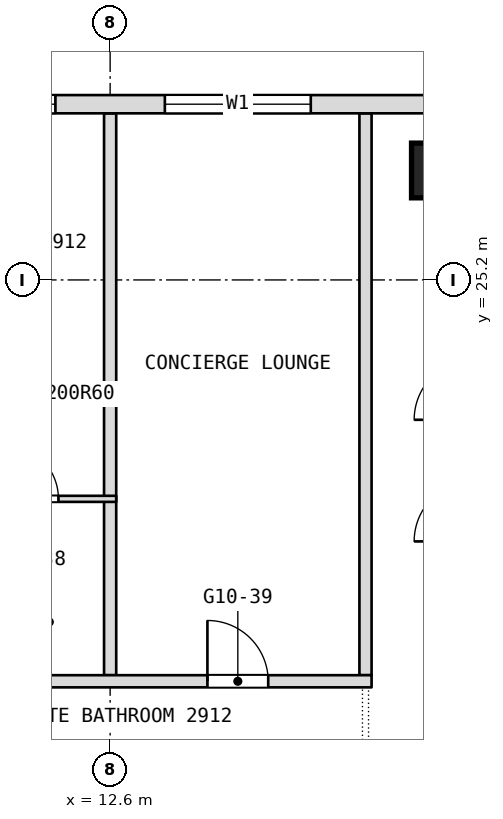
"""IFC4 building model, lengths in metres.
Left out: names, types, materials, properties, quantities, classifications, styles, units other than length and angle.
Written with IfcOpenShell. Run it as: python <this file> out.ifc"""

import sys

from ifc_helpers import new_model, si_unit, direction, frame, frame_2d, origin, origin_2d, place, context, subcontext, project, spatial, rectangle, extrude, element, fill, save


model = new_model("IFC4")
c1 = context("Model", 3, precision=1e-05, world=origin(), true_north=direction((0.0, 1.0)))
c2 = subcontext(c1, "Body", "Model", "MODEL_VIEW")
j1 = project(units=[si_unit("LENGTHUNIT", "METRE"), si_unit("PLANEANGLEUNIT", "RADIAN")], contexts=[c1])
p1 = place(None, origin())
s1 = spatial("IfcSite", under=j1, at=p1, CompositionType="ELEMENT")
p2 = place(p1, origin())
s2 = spatial("IfcBuilding", under=s1, at=p2, CompositionType="ELEMENT")
p3 = place(p2, frame((0.0, 0.0, 130.1)))
s3 = spatial("IfcBuildingStorey", under=s2, at=p3, CompositionType="ELEMENT", Elevation=130.1)
p4 = place(p3, frame((18.007, 27.0, 0.0), z_axis=(0.0, 0.0, 1.0), x_axis=(1.0, 0.0, 0.0)))
e1 = element("IfcColumn", 1, at=p4, inside=s3, PredefinedType="COLUMN", context=c2, shape_type="SweptSolid", body=[
    extrude(rectangle(XDim=0.9, YDim=0.9, at=origin_2d()), origin(), (0.0, 0.0, 1.0), 3.6),
])
for number, where, z_axis, x_axis in (
    (2, (16.8, 18.7, 0.0), (0.0, 0.0, 1.0), (0.0, 1.0, 0.0)),
    (3, (12.6, 18.7, 0.0), (0.0, 0.0, 1.0), (0.0, 1.0, 0.0)),
):
    element("IfcWall", number, at=place(p3, frame(where, z_axis=z_axis, x_axis=x_axis)), inside=s3, PredefinedType="PARTITIONING", context=c2, shape_type="SweptSolid", body=[
        extrude(rectangle(XDim=9.24, YDim=0.2, at=frame_2d((4.62, 0.0))), origin(), (0.0, 0.0, 1.0), 3.34),
    ])
p5 = place(p3, frame((10.7, 18.6, 0.0), z_axis=(0.0, 0.0, 1.0), x_axis=(1.0, 0.0, 0.0)))
e4 = element("IfcWall", 4, at=p5, inside=s3, PredefinedType="PARTITIONING", context=c2, shape_type="SweptSolid", body=[
    extrude(rectangle(XDim=6.2, YDim=0.2, at=frame_2d((3.1, 0.0))), origin(), (0.0, 0.0, 1.0), 3.34),
])
p6 = place(p5, frame((3.5, 0.0, 0.0)))
e5 = element("IfcOpeningElement", 5, at=p6, cuts=e4, PredefinedType="OPENING", context=c2, shape_type="SweptSolid", body=[
    extrude(rectangle(XDim=1.0, YDim=2.1, at=frame_2d((0.5, 1.05))), frame((0.0, 0.1, 0.0), z_axis=(0.0, -1.0, 0.0), x_axis=(1.0, 0.0, 0.0)), (0.0, 0.0, 1.0), 0.2),
])
p7 = place(p3, frame((10.7, 21.6, 0.0), z_axis=(0.0, 0.0, 1.0), x_axis=(1.0, 0.0, 0.0)))
e6 = element("IfcWall", 6, at=p7, inside=s3, PredefinedType="PARTITIONING", context=c2, shape_type="SweptSolid", body=[
    extrude(rectangle(XDim=2.0, YDim=0.1, at=frame_2d((1.0, 0.0))), origin(), (0.0, 0.0, 1.0), 3.34),
])
p8 = place(p7, frame((0.15, 0.0, 0.0)))
e7 = element("IfcOpeningElement", 7, at=p8, cuts=e6, PredefinedType="OPENING", context=c2, shape_type="SweptSolid", body=[
    extrude(rectangle(XDim=0.9, YDim=2.1, at=frame_2d((0.45, 1.05))), frame((0.0, 0.05, 0.0), z_axis=(0.0, -1.0, 0.0), x_axis=(1.0, 0.0, 0.0)), (0.0, 0.0, 1.0), 0.1),
])
p9 = place(p3, frame((21.306, 28.09, 0.0), z_axis=(0.0, 0.0, 1.0), x_axis=(-1.0, 0.0, 0.0)))
e8 = element("IfcWall", 8, at=p9, inside=s3, PredefinedType="NOTDEFINED", context=c2, shape_type="SweptSolid", body=[
    extrude(rectangle(XDim=42.612, YDim=0.3, at=frame_2d((21.306, 0.0))), origin(), (0.0, 0.0, 1.0), 3.6),
])
p10 = place(p9, frame((5.406, 0.0, 0.9)))
e9 = element("IfcOpeningElement", 9, at=p10, cuts=e8, PredefinedType="OPENING", context=c2, shape_type="SweptSolid", body=[
    extrude(rectangle(XDim=2.4, YDim=2.1, at=frame_2d((1.2, 1.05))), frame((0.0, 0.15, 0.0), z_axis=(0.0, -1.0, 0.0), x_axis=(1.0, 0.0, 0.0)), (0.0, 0.0, 1.0), 0.3),
])
p11 = place(p9, frame((9.606, 0.0, 0.9)))
e10 = element("IfcOpeningElement", 10, at=p11, cuts=e8, PredefinedType="OPENING", context=c2, shape_type="SweptSolid", body=[
    extrude(rectangle(XDim=2.4, YDim=2.1, at=frame_2d((1.2, 1.05))), frame((0.0, 0.15, 0.0), z_axis=(0.0, -1.0, 0.0), x_axis=(1.0, 0.0, 0.0)), (0.0, 0.0, 1.0), 0.3),
])
p12 = place(p9, frame((13.806, 0.0, 0.9)))
e11 = element("IfcOpeningElement", 11, at=p12, cuts=e8, PredefinedType="OPENING", context=c2, shape_type="SweptSolid", body=[
    extrude(rectangle(XDim=2.4, YDim=2.1, at=frame_2d((1.2, 1.05))), frame((0.0, 0.15, 0.0), z_axis=(0.0, -1.0, 0.0), x_axis=(1.0, 0.0, 0.0)), (0.0, 0.0, 1.0), 0.3),
])
p13 = place(p9, frame((18.006, 0.0, 0.9)))
e12 = element("IfcOpeningElement", 12, at=p13, cuts=e8, PredefinedType="OPENING", context=c2, shape_type="SweptSolid", body=[
    extrude(rectangle(XDim=2.4, YDim=2.1, at=frame_2d((1.2, 1.05))), frame((0.0, 0.15, 0.0), z_axis=(0.0, -1.0, 0.0), x_axis=(1.0, 0.0, 0.0)), (0.0, 0.0, 1.0), 0.3),
])
p14 = place(p9, frame((22.206, 0.0, 0.9)))
e13 = element("IfcOpeningElement", 13, at=p14, cuts=e8, PredefinedType="OPENING", context=c2, shape_type="SweptSolid", body=[
    extrude(rectangle(XDim=2.4, YDim=2.1, at=frame_2d((1.2, 1.05))), frame((0.0, 0.15, 0.0), z_axis=(0.0, -1.0, 0.0), x_axis=(1.0, 0.0, 0.0)), (0.0, 0.0, 1.0), 0.3),
])
p15 = place(p9, frame((26.406, 0.0, 0.9)))
e14 = element("IfcOpeningElement", 14, at=p15, cuts=e8, PredefinedType="OPENING", context=c2, shape_type="SweptSolid", body=[
    extrude(rectangle(XDim=2.4, YDim=2.1, at=frame_2d((1.2, 1.05))), frame((0.0, 0.15, 0.0), z_axis=(0.0, -1.0, 0.0), x_axis=(1.0, 0.0, 0.0)), (0.0, 0.0, 1.0), 0.3),
])
p16 = place(p9, frame((30.606, 0.0, 0.9)))
e15 = element("IfcOpeningElement", 15, at=p16, cuts=e8, PredefinedType="OPENING", context=c2, shape_type="SweptSolid", body=[
    extrude(rectangle(XDim=2.4, YDim=2.1, at=frame_2d((1.2, 1.05))), frame((0.0, 0.15, 0.0), z_axis=(0.0, -1.0, 0.0), x_axis=(1.0, 0.0, 0.0)), (0.0, 0.0, 1.0), 0.3),
])
p17 = place(p9, frame((34.806, 0.0, 0.9)))
e16 = element("IfcOpeningElement", 16, at=p17, cuts=e8, PredefinedType="OPENING", context=c2, shape_type="SweptSolid", body=[
    extrude(rectangle(XDim=2.4, YDim=2.1, at=frame_2d((1.2, 1.05))), frame((0.0, 0.15, 0.0), z_axis=(0.0, -1.0, 0.0), x_axis=(1.0, 0.0, 0.0)), (0.0, 0.0, 1.0), 0.3),
])
p18 = place(p6, origin())
e17 = element("IfcDoor", 17, at=p18, inside=s3, OperationType="SINGLE_SWING_RIGHT", PredefinedType="DOOR", context=c2, shape_type="SweptSolid", body=[
    extrude(rectangle(XDim=1.0, YDim=2.1, at=frame_2d((0.5, 1.05))), frame((0.0, 0.025, 0.0), z_axis=(0.0, -1.0, 0.0), x_axis=(1.0, 0.0, 0.0)), (0.0, 0.0, 1.0), 0.05),
])
fill(e5, e17)
p19 = place(p8, origin())
e18 = element("IfcDoor", 18, at=p19, inside=s3, OperationType="SINGLE_SWING_RIGHT", PredefinedType="DOOR", context=c2, shape_type="SweptSolid", body=[
    extrude(rectangle(XDim=0.9, YDim=2.1, at=frame_2d((0.45, 1.05))), frame((0.0, 0.025, 0.0), z_axis=(0.0, -1.0, 0.0), x_axis=(1.0, 0.0, 0.0)), (0.0, 0.0, 1.0), 0.05),
])
fill(e7, e18)
p20 = place(p10, origin())
e19 = element("IfcWindow", 19, at=p20, inside=s3, PartitioningType="SINGLE_PANEL", PredefinedType="WINDOW", context=c2, shape_type="SweptSolid", body=[
    extrude(rectangle(XDim=2.4, YDim=2.1, at=frame_2d((1.2, 1.05))), frame((0.0, 0.03, 0.0), z_axis=(0.0, -1.0, 0.0), x_axis=(1.0, 0.0, 0.0)), (0.0, 0.0, 1.0), 0.06),
])
fill(e9, e19)
p21 = place(p11, origin())
e20 = element("IfcWindow", 20, at=p21, inside=s3, PartitioningType="SINGLE_PANEL", PredefinedType="WINDOW", context=c2, shape_type="SweptSolid", body=[
    extrude(rectangle(XDim=2.4, YDim=2.1, at=frame_2d((1.2, 1.05))), frame((0.0, 0.03, 0.0), z_axis=(0.0, -1.0, 0.0), x_axis=(1.0, 0.0, 0.0)), (0.0, 0.0, 1.0), 0.06),
])
fill(e10, e20)
save(model, sys.argv[1])
